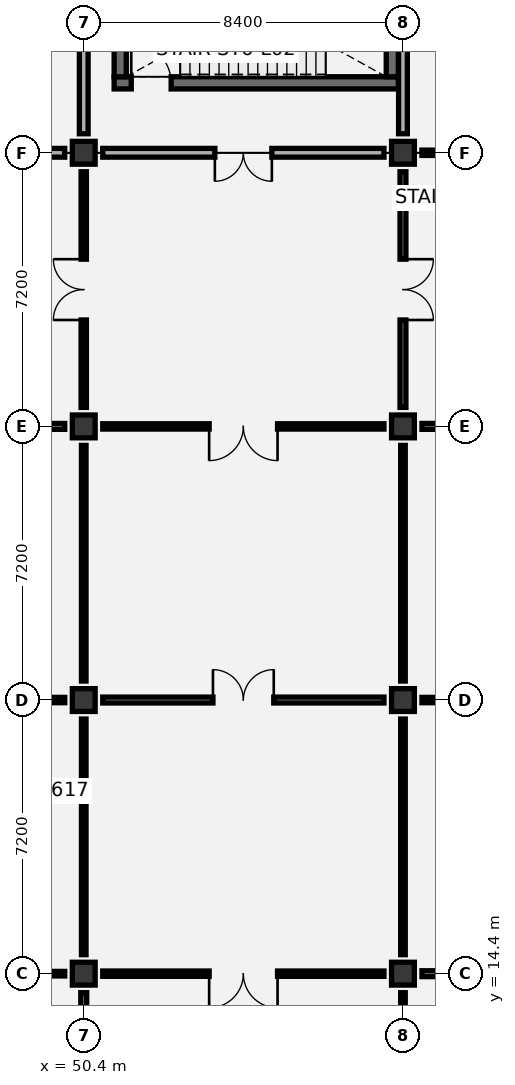
"""IFC4 building model, lengths in metres.
Left out: names, types, materials, properties, quantities, classifications, styles, units other than length and angle.
Written with IfcOpenShell. Run it as: python <this file> out.ifc"""

import sys

from ifc_helpers import new_model, si_unit, direction, frame, frame_2d, origin, origin_2d, place, context, subcontext, project, spatial, rectangle, extrude, element, fill, save


model = new_model("IFC4")
c1 = context("Model", 3, precision=1e-05, world=origin(), true_north=direction((0.0, 1.0)))
c2 = subcontext(c1, "Body", "Model", "MODEL_VIEW")
j1 = project(units=[si_unit("LENGTHUNIT", "METRE"), si_unit("PLANEANGLEUNIT", "RADIAN")], contexts=[c1])
p1 = place(None, origin())
s1 = spatial("IfcSite", under=j1, at=p1, CompositionType="ELEMENT")
p2 = place(p1, origin())
s2 = spatial("IfcBuilding", under=s1, at=p2, CompositionType="ELEMENT")
p3 = place(p2, frame((0.0, 0.0, 11.4)))
s3 = spatial("IfcBuildingStorey", under=s2, at=p3, CompositionType="ELEMENT", Elevation=11.4)
for number, where, z_axis, x_axis in (
    (1, (50.4, 14.4, 0.0), (0.0, 0.0, 1.0), (1.0, 0.0, 0.0)),
    (2, (50.4, 21.6, 0.0), (0.0, 0.0, 1.0), (1.0, 0.0, 0.0)),
    (3, (50.4, 28.8, 0.0), (0.0, 0.0, 1.0), (1.0, 0.0, 0.0)),
    (4, (50.4, 36.0, 0.0), (0.0, 0.0, 1.0), (1.0, 0.0, 0.0)),
    (5, (58.8, 14.4, 0.0), (0.0, 0.0, 1.0), (1.0, 0.0, 0.0)),
    (6, (58.8, 21.6, 0.0), (0.0, 0.0, 1.0), (1.0, 0.0, 0.0)),
    (7, (58.8, 28.8, 0.0), (0.0, 0.0, 1.0), (1.0, 0.0, 0.0)),
    (8, (58.8, 36.0, 0.0), (0.0, 0.0, 1.0), (1.0, 0.0, 0.0)),
):
    element("IfcColumn", number, at=place(p3, frame(where, z_axis=z_axis, x_axis=x_axis)), inside=s3, PredefinedType="COLUMN", context=c2, shape_type="SweptSolid", body=[
        extrude(rectangle(XDim=0.6, YDim=0.6, at=origin_2d()), origin(), (0.0, 0.0, 1.0), 5.4),
    ])
p4 = place(p3, frame((51.2, 37.84, 0.0), z_axis=(0.0, 0.0, 1.0), x_axis=(1.0, 0.0, 0.0)))
e9 = element("IfcWall", 9, at=p4, inside=s3, PredefinedType="SHEAR", context=c2, shape_type="SweptSolid", body=[
    extrude(rectangle(XDim=7.48, YDim=0.32, at=frame_2d((3.74, 0.0))), origin(), (0.0, 0.0, 1.0), 5.1),
])
p5 = place(p4, frame((0.45, 0.0, 0.0)))
e10 = element("IfcOpeningElement", 10, at=p5, cuts=e9, PredefinedType="OPENING", context=c2, shape_type="SweptSolid", body=[
    extrude(rectangle(XDim=1.05, YDim=2.15, at=frame_2d((0.525, 1.075))), frame((0.0, 0.17, 0.0), z_axis=(0.0, -1.0, 0.0), x_axis=(1.0, 0.0, 0.0)), (0.0, 0.0, 1.0), 0.34),
])
for number, where, z_axis, x_axis in (
    (11, (51.36, 38.0, 0.0), (0.0, 0.0, 1.0), (0.0, 1.0, 0.0)),
    (12, (58.52, 38.0, 0.0), (0.0, 0.0, 1.0), (0.0, 1.0, 0.0)),
):
    element("IfcWall", number, at=place(p3, frame(where, z_axis=z_axis, x_axis=x_axis)), inside=s3, PredefinedType="SHEAR", context=c2, shape_type="SweptSolid", body=[
        extrude(rectangle(XDim=3.8, YDim=0.32, at=frame_2d((1.9, 0.0))), origin(), (0.0, 0.0, 1.0), 5.1),
    ])
p6 = place(p3, frame((42.15, 19.2, 0.0), z_axis=(0.0, 0.0, 1.0), x_axis=(1.0, 0.0, 0.0)))
e13 = element("IfcWall", 13, at=p6, inside=s3, PredefinedType="PARTITIONING", context=c2, shape_type="SweptSolid", body=[
    extrude(rectangle(XDim=8.1, YDim=0.12, at=frame_2d((4.05, 0.0))), origin(), (0.0, 0.0, 1.0), 5.1),
])
p7 = place(p6, frame((1.08, 0.0, 0.0)))
e14 = element("IfcOpeningElement", 14, at=p7, cuts=e13, PredefinedType="OPENING", context=c2, shape_type="SweptSolid", body=[
    extrude(rectangle(XDim=0.95, YDim=2.1, at=frame_2d((0.475, 1.05))), frame((0.0, 0.07, 0.0), z_axis=(0.0, -1.0, 0.0), x_axis=(1.0, 0.0, 0.0)), (0.0, 0.0, 1.0), 0.14),
])
p8 = place(p6, frame((3.63, 0.0, 0.0)))
e15 = element("IfcOpeningElement", 15, at=p8, cuts=e13, PredefinedType="OPENING", context=c2, shape_type="SweptSolid", body=[
    extrude(rectangle(XDim=0.9, YDim=2.1, at=frame_2d((0.45, 1.05))), frame((0.0, 0.07, 0.0), z_axis=(0.0, -1.0, 0.0), x_axis=(1.0, 0.0, 0.0)), (0.0, 0.0, 1.0), 0.14),
])
p9 = place(p6, frame((6.13, 0.0, 0.0)))
e16 = element("IfcOpeningElement", 16, at=p9, cuts=e13, PredefinedType="OPENING", context=c2, shape_type="SweptSolid", body=[
    extrude(rectangle(XDim=1.0, YDim=2.1, at=frame_2d((0.5, 1.05))), frame((0.0, 0.07, 0.0), z_axis=(0.0, -1.0, 0.0), x_axis=(1.0, 0.0, 0.0)), (0.0, 0.0, 1.0), 0.14),
])
p10 = place(p3, frame((50.4, 7.7, 0.0), z_axis=(0.0, 0.0, 1.0), x_axis=(0.0, 1.0, 0.0)))
e17 = element("IfcWall", 17, at=p10, inside=s3, PredefinedType="PARTITIONING", context=c2, shape_type="SweptSolid", body=[
    extrude(rectangle(XDim=6.2, YDim=0.155, at=frame_2d((3.1, 0.0))), origin(), (0.0, 0.0, 1.0), 4.395),
])
p11 = place(p10, frame((2.2, 0.0, 0.0)))
e18 = element("IfcOpeningElement", 18, at=p11, cuts=e17, PredefinedType="OPENING", context=c2, shape_type="SweptSolid", body=[
    extrude(rectangle(XDim=1.8, YDim=2.25, at=frame_2d((0.9, 1.125))), frame((0.0, 0.087, 0.0), z_axis=(0.0, -1.0, 0.0), x_axis=(1.0, 0.0, 0.0)), (0.0, 0.0, 1.0), 0.175),
])
p12 = place(p3, frame((42.5, 14.4, 0.0), z_axis=(0.0, 0.0, 1.0), x_axis=(1.0, 0.0, 0.0)))
e19 = element("IfcWall", 19, at=p12, inside=s3, PredefinedType="PARTITIONING", context=c2, shape_type="SweptSolid", body=[
    extrude(rectangle(XDim=7.4, YDim=0.12, at=frame_2d((3.7, 0.0))), origin(), (0.0, 0.0, 1.0), 4.345),
])
p13 = place(p3, frame((50.4, 14.9, 0.0), z_axis=(0.0, 0.0, 1.0), x_axis=(0.0, 1.0, 0.0)))
e20 = element("IfcWall", 20, at=p13, inside=s3, PredefinedType="PARTITIONING", context=c2, shape_type="SweptSolid", body=[
    extrude(rectangle(XDim=6.2, YDim=0.12, at=frame_2d((3.1, 0.0))), origin(), (0.0, 0.0, 1.0), 4.595),
])
p14 = place(p3, frame((42.5, 21.6, 0.0), z_axis=(0.0, 0.0, 1.0), x_axis=(1.0, 0.0, 0.0)))
e21 = element("IfcWall", 21, at=p14, inside=s3, PredefinedType="PARTITIONING", context=c2, shape_type="SweptSolid", body=[
    extrude(rectangle(XDim=7.4, YDim=0.14, at=frame_2d((3.7, 0.0))), origin(), (0.0, 0.0, 1.0), 4.345),
])
p15 = place(p14, frame((2.9, 0.0, 0.0)))
e22 = element("IfcOpeningElement", 22, at=p15, cuts=e21, PredefinedType="OPENING", context=c2, shape_type="SweptSolid", body=[
    extrude(rectangle(XDim=1.6, YDim=2.2, at=frame_2d((0.8, 1.1))), frame((0.0, 0.08, 0.0), z_axis=(0.0, -1.0, 0.0), x_axis=(1.0, 0.0, 0.0)), (0.0, 0.0, 1.0), 0.16),
])
p16 = place(p3, frame((50.4, 22.1, 0.0), z_axis=(0.0, 0.0, 1.0), x_axis=(0.0, 1.0, 0.0)))
e23 = element("IfcWall", 23, at=p16, inside=s3, PredefinedType="PARTITIONING", context=c2, shape_type="SweptSolid", body=[
    extrude(rectangle(XDim=6.2, YDim=0.12, at=frame_2d((3.1, 0.0))), origin(), (0.0, 0.0, 1.0), 4.395),
])
p17 = place(p3, frame((42.5, 28.8, 0.0), z_axis=(0.0, 0.0, 1.0), x_axis=(1.0, 0.0, 0.0)))
e24 = element("IfcWall", 24, at=p17, inside=s3, PredefinedType="PARTITIONING", context=c2, shape_type="SweptSolid", body=[
    extrude(rectangle(XDim=7.4, YDim=0.155, at=frame_2d((3.7, 0.0))), origin(), (0.0, 0.0, 1.0), 4.345),
])
p18 = place(p17, frame((2.8, 0.0, 0.0)))
e25 = element("IfcOpeningElement", 25, at=p18, cuts=e24, PredefinedType="OPENING", context=c2, shape_type="SweptSolid", body=[
    extrude(rectangle(XDim=1.8, YDim=2.25, at=frame_2d((0.9, 1.125))), frame((0.0, 0.087, 0.0), z_axis=(0.0, -1.0, 0.0), x_axis=(1.0, 0.0, 0.0)), (0.0, 0.0, 1.0), 0.175),
])
p19 = place(p3, frame((50.4, 29.3, 0.0), z_axis=(0.0, 0.0, 1.0), x_axis=(0.0, 1.0, 0.0)))
e26 = element("IfcWall", 26, at=p19, inside=s3, PredefinedType="PARTITIONING", context=c2, shape_type="SweptSolid", body=[
    extrude(rectangle(XDim=6.2, YDim=0.14, at=frame_2d((3.1, 0.0))), origin(), (0.0, 0.0, 1.0), 4.695),
])
p20 = place(p19, frame((2.3, 0.0, 0.0)))
e27 = element("IfcOpeningElement", 27, at=p20, cuts=e26, PredefinedType="OPENING", context=c2, shape_type="SweptSolid", body=[
    extrude(rectangle(XDim=1.6, YDim=2.2, at=frame_2d((0.8, 1.1))), frame((0.0, 0.08, 0.0), z_axis=(0.0, -1.0, 0.0), x_axis=(1.0, 0.0, 0.0)), (0.0, 0.0, 1.0), 0.16),
])
p21 = place(p3, frame((42.5, 36.0, 0.0), z_axis=(0.0, 0.0, 1.0), x_axis=(1.0, 0.0, 0.0)))
e28 = element("IfcWall", 28, at=p21, inside=s3, PredefinedType="PARTITIONING", context=c2, shape_type="SweptSolid", body=[
    extrude(rectangle(XDim=7.4, YDim=0.23, at=frame_2d((3.7, 0.0))), origin(), (0.0, 0.0, 1.0), 4.345),
])
p22 = place(p21, frame((2.95, 0.0, 0.0)))
e29 = element("IfcOpeningElement", 29, at=p22, cuts=e28, PredefinedType="OPENING", context=c2, shape_type="SweptSolid", body=[
    extrude(rectangle(XDim=1.5, YDim=2.15, at=frame_2d((0.75, 1.075))), frame((0.0, 0.125, 0.0), z_axis=(0.0, -1.0, 0.0), x_axis=(1.0, 0.0, 0.0)), (0.0, 0.0, 1.0), 0.25),
])
p23 = place(p3, frame((50.4, 36.5, 0.0), z_axis=(0.0, 0.0, 1.0), x_axis=(0.0, 1.0, 0.0)))
e30 = element("IfcWall", 30, at=p23, inside=s3, PredefinedType="PARTITIONING", context=c2, shape_type="SweptSolid", body=[
    extrude(rectangle(XDim=6.2, YDim=0.23, at=frame_2d((3.1, 0.0))), origin(), (0.0, 0.0, 1.0), 4.395),
])
p24 = place(p3, frame((58.8, 7.7, 0.0), z_axis=(0.0, 0.0, 1.0), x_axis=(0.0, 1.0, 0.0)))
e31 = element("IfcWall", 31, at=p24, inside=s3, PredefinedType="PARTITIONING", context=c2, shape_type="SweptSolid", body=[
    extrude(rectangle(XDim=6.2, YDim=0.12, at=frame_2d((3.1, 0.0))), origin(), (0.0, 0.0, 1.0), 4.595),
])
p25 = place(p3, frame((50.9, 14.4, 0.0), z_axis=(0.0, 0.0, 1.0), x_axis=(1.0, 0.0, 0.0)))
e32 = element("IfcWall", 32, at=p25, inside=s3, PredefinedType="PARTITIONING", context=c2, shape_type="SweptSolid", body=[
    extrude(rectangle(XDim=7.4, YDim=0.14, at=frame_2d((3.7, 0.0))), origin(), (0.0, 0.0, 1.0), 4.345),
])
p26 = place(p25, frame((2.8, 0.0, 0.0)))
e33 = element("IfcOpeningElement", 33, at=p26, cuts=e32, PredefinedType="OPENING", context=c2, shape_type="SweptSolid", body=[
    extrude(rectangle(XDim=1.8, YDim=2.25, at=frame_2d((0.9, 1.125))), frame((0.0, 0.08, 0.0), z_axis=(0.0, -1.0, 0.0), x_axis=(1.0, 0.0, 0.0)), (0.0, 0.0, 1.0), 0.16),
])
p27 = place(p3, frame((58.8, 14.9, 0.0), z_axis=(0.0, 0.0, 1.0), x_axis=(0.0, 1.0, 0.0)))
e34 = element("IfcWall", 34, at=p27, inside=s3, PredefinedType="PARTITIONING", context=c2, shape_type="SweptSolid", body=[
    extrude(rectangle(XDim=6.2, YDim=0.12, at=frame_2d((3.1, 0.0))), origin(), (0.0, 0.0, 1.0), 4.395),
])
p28 = place(p3, frame((50.9, 21.6, 0.0), z_axis=(0.0, 0.0, 1.0), x_axis=(1.0, 0.0, 0.0)))
e35 = element("IfcWall", 35, at=p28, inside=s3, PredefinedType="PARTITIONING", context=c2, shape_type="SweptSolid", body=[
    extrude(rectangle(XDim=7.4, YDim=0.155, at=frame_2d((3.7, 0.0))), origin(), (0.0, 0.0, 1.0), 4.345),
])
p29 = place(p28, frame((2.9, 0.0, 0.0)))
e36 = element("IfcOpeningElement", 36, at=p29, cuts=e35, PredefinedType="OPENING", context=c2, shape_type="SweptSolid", body=[
    extrude(rectangle(XDim=1.6, YDim=2.2, at=frame_2d((0.8, 1.1))), frame((0.0, 0.087, 0.0), z_axis=(0.0, -1.0, 0.0), x_axis=(1.0, 0.0, 0.0)), (0.0, 0.0, 1.0), 0.175),
])
p30 = place(p3, frame((58.8, 22.1, 0.0), z_axis=(0.0, 0.0, 1.0), x_axis=(0.0, 1.0, 0.0)))
e37 = element("IfcWall", 37, at=p30, inside=s3, PredefinedType="PARTITIONING", context=c2, shape_type="SweptSolid", body=[
    extrude(rectangle(XDim=6.2, YDim=0.12, at=frame_2d((3.1, 0.0))), origin(), (0.0, 0.0, 1.0), 4.695),
])
p31 = place(p3, frame((50.9, 28.8, 0.0), z_axis=(0.0, 0.0, 1.0), x_axis=(1.0, 0.0, 0.0)))
e38 = element("IfcWall", 38, at=p31, inside=s3, PredefinedType="PARTITIONING", context=c2, shape_type="SweptSolid", body=[
    extrude(rectangle(XDim=7.4, YDim=0.14, at=frame_2d((3.7, 0.0))), origin(), (0.0, 0.0, 1.0), 4.345),
])
p32 = place(p31, frame((2.8, 0.0, 0.0)))
e39 = element("IfcOpeningElement", 39, at=p32, cuts=e38, PredefinedType="OPENING", context=c2, shape_type="SweptSolid", body=[
    extrude(rectangle(XDim=1.8, YDim=2.25, at=frame_2d((0.9, 1.125))), frame((0.0, 0.08, 0.0), z_axis=(0.0, -1.0, 0.0), x_axis=(1.0, 0.0, 0.0)), (0.0, 0.0, 1.0), 0.16),
])
p33 = place(p3, frame((58.8, 29.3, 0.0), z_axis=(0.0, 0.0, 1.0), x_axis=(0.0, 1.0, 0.0)))
e40 = element("IfcWall", 40, at=p33, inside=s3, PredefinedType="PARTITIONING", context=c2, shape_type="SweptSolid", body=[
    extrude(rectangle(XDim=6.2, YDim=0.155, at=frame_2d((3.1, 0.0))), origin(), (0.0, 0.0, 1.0), 4.395),
])
p34 = place(p33, frame((2.3, 0.0, 0.0)))
e41 = element("IfcOpeningElement", 41, at=p34, cuts=e40, PredefinedType="OPENING", context=c2, shape_type="SweptSolid", body=[
    extrude(rectangle(XDim=1.6, YDim=2.2, at=frame_2d((0.8, 1.1))), frame((0.0, 0.087, 0.0), z_axis=(0.0, -1.0, 0.0), x_axis=(1.0, 0.0, 0.0)), (0.0, 0.0, 1.0), 0.175),
])
p35 = place(p3, frame((50.9, 36.0, 0.0), z_axis=(0.0, 0.0, 1.0), x_axis=(1.0, 0.0, 0.0)))
e42 = element("IfcWall", 42, at=p35, inside=s3, PredefinedType="PARTITIONING", context=c2, shape_type="SweptSolid", body=[
    extrude(rectangle(XDim=7.4, YDim=0.23, at=frame_2d((3.7, 0.0))), origin(), (0.0, 0.0, 1.0), 4.345),
])
p36 = place(p35, frame((2.95, 0.0, 0.0)))
e43 = element("IfcOpeningElement", 43, at=p36, cuts=e42, PredefinedType="OPENING", context=c2, shape_type="SweptSolid", body=[
    extrude(rectangle(XDim=1.5, YDim=2.15, at=frame_2d((0.75, 1.075))), frame((0.0, 0.125, 0.0), z_axis=(0.0, -1.0, 0.0), x_axis=(1.0, 0.0, 0.0)), (0.0, 0.0, 1.0), 0.25),
])
p37 = place(p3, frame((58.8, 36.5, 0.0), z_axis=(0.0, 0.0, 1.0), x_axis=(0.0, 1.0, 0.0)))
e44 = element("IfcWall", 44, at=p37, inside=s3, PredefinedType="PARTITIONING", context=c2, shape_type="SweptSolid", body=[
    extrude(rectangle(XDim=6.2, YDim=0.23, at=frame_2d((3.1, 0.0))), origin(), (0.0, 0.0, 1.0), 4.805),
])
p38 = place(p3, frame((59.3, 14.4, 0.0), z_axis=(0.0, 0.0, 1.0), x_axis=(1.0, 0.0, 0.0)))
e45 = element("IfcWall", 45, at=p38, inside=s3, PredefinedType="PARTITIONING", context=c2, shape_type="SweptSolid", body=[
    extrude(rectangle(XDim=7.4, YDim=0.155, at=frame_2d((3.7, 0.0))), origin(), (0.0, 0.0, 1.0), 4.345),
])
p39 = place(p38, frame((2.8, 0.0, 0.0)))
e46 = element("IfcOpeningElement", 46, at=p39, cuts=e45, PredefinedType="OPENING", context=c2, shape_type="SweptSolid", body=[
    extrude(rectangle(XDim=1.8, YDim=2.25, at=frame_2d((0.9, 1.125))), frame((0.0, 0.087, 0.0), z_axis=(0.0, -1.0, 0.0), x_axis=(1.0, 0.0, 0.0)), (0.0, 0.0, 1.0), 0.175),
])
p40 = place(p3, frame((59.3, 21.6, 0.0), z_axis=(0.0, 0.0, 1.0), x_axis=(1.0, 0.0, 0.0)))
e47 = element("IfcWall", 47, at=p40, inside=s3, PredefinedType="PARTITIONING", context=c2, shape_type="SweptSolid", body=[
    extrude(rectangle(XDim=7.4, YDim=0.14, at=frame_2d((3.7, 0.0))), origin(), (0.0, 0.0, 1.0), 4.345),
])
p41 = place(p40, frame((2.9, 0.0, 0.0)))
e48 = element("IfcOpeningElement", 48, at=p41, cuts=e47, PredefinedType="OPENING", context=c2, shape_type="SweptSolid", body=[
    extrude(rectangle(XDim=1.6, YDim=2.2, at=frame_2d((0.8, 1.1))), frame((0.0, 0.08, 0.0), z_axis=(0.0, -1.0, 0.0), x_axis=(1.0, 0.0, 0.0)), (0.0, 0.0, 1.0), 0.16),
])
p42 = place(p3, frame((59.3, 28.8, 0.0), z_axis=(0.0, 0.0, 1.0), x_axis=(1.0, 0.0, 0.0)))
e49 = element("IfcWall", 49, at=p42, inside=s3, PredefinedType="PARTITIONING", context=c2, shape_type="SweptSolid", body=[
    extrude(rectangle(XDim=7.4, YDim=0.155, at=frame_2d((3.7, 0.0))), origin(), (0.0, 0.0, 1.0), 4.345),
])
p43 = place(p42, frame((2.8, 0.0, 0.0)))
e50 = element("IfcOpeningElement", 50, at=p43, cuts=e49, PredefinedType="OPENING", context=c2, shape_type="SweptSolid", body=[
    extrude(rectangle(XDim=1.8, YDim=2.25, at=frame_2d((0.9, 1.125))), frame((0.0, 0.087, 0.0), z_axis=(0.0, -1.0, 0.0), x_axis=(1.0, 0.0, 0.0)), (0.0, 0.0, 1.0), 0.175),
])
p44 = place(p3, frame((59.3, 36.0, 0.0), z_axis=(0.0, 0.0, 1.0), x_axis=(1.0, 0.0, 0.0)))
e51 = element("IfcWall", 51, at=p44, inside=s3, PredefinedType="PARTITIONING", context=c2, shape_type="SweptSolid", body=[
    extrude(rectangle(XDim=7.4, YDim=0.14, at=frame_2d((3.7, 0.0))), origin(), (0.0, 0.0, 1.0), 4.345),
])
p45 = place(p44, frame((2.9, 0.0, 0.0)))
e52 = element("IfcOpeningElement", 52, at=p45, cuts=e51, PredefinedType="OPENING", context=c2, shape_type="SweptSolid", body=[
    extrude(rectangle(XDim=1.6, YDim=2.2, at=frame_2d((0.8, 1.1))), frame((0.0, 0.08, 0.0), z_axis=(0.0, -1.0, 0.0), x_axis=(1.0, 0.0, 0.0)), (0.0, 0.0, 1.0), 0.16),
])
p46 = place(p5, origin())
e53 = element("IfcDoor", 53, at=p46, inside=s3, OperationType="SINGLE_SWING_LEFT", PredefinedType="DOOR", context=c2, shape_type="SweptSolid", body=[
    extrude(rectangle(XDim=1.05, YDim=2.15, at=frame_2d((0.525, 1.075))), frame((0.0, 0.025, 0.0), z_axis=(0.0, -1.0, 0.0), x_axis=(1.0, 0.0, 0.0)), (0.0, 0.0, 1.0), 0.05),
])
fill(e10, e53)
p47 = place(p20, origin())
e54 = element("IfcDoor", 54, at=p47, inside=s3, OperationType="DOUBLE_DOOR_SINGLE_SWING", PredefinedType="DOOR", context=c2, shape_type="SweptSolid", body=[
    extrude(rectangle(XDim=1.6, YDim=2.2, at=frame_2d((0.8, 1.1))), frame((0.0, 0.025, 0.0), z_axis=(0.0, -1.0, 0.0), x_axis=(1.0, 0.0, 0.0)), (0.0, 0.0, 1.0), 0.05),
])
fill(e27, e54)
p48 = place(p26, frame((1.8, 0.0, 0.0), z_axis=(0.0, 0.0, 1.0), x_axis=(-1.0, 0.0, 0.0)))
e55 = element("IfcDoor", 55, at=p48, inside=s3, OperationType="DOUBLE_DOOR_SINGLE_SWING", PredefinedType="DOOR", context=c2, shape_type="SweptSolid", body=[
    extrude(rectangle(XDim=1.8, YDim=2.25, at=frame_2d((0.9, 1.125))), frame((0.0, 0.025, 0.0), z_axis=(0.0, -1.0, 0.0), x_axis=(1.0, 0.0, 0.0)), (0.0, 0.0, 1.0), 0.05),
])
fill(e33, e55)
p49 = place(p29, origin())
e56 = element("IfcDoor", 56, at=p49, inside=s3, OperationType="DOUBLE_DOOR_SINGLE_SWING", PredefinedType="DOOR", context=c2, shape_type="SweptSolid", body=[
    extrude(rectangle(XDim=1.6, YDim=2.2, at=frame_2d((0.8, 1.1))), frame((0.0, 0.025, 0.0), z_axis=(0.0, -1.0, 0.0), x_axis=(1.0, 0.0, 0.0)), (0.0, 0.0, 1.0), 0.05),
])
fill(e36, e56)
p50 = place(p32, frame((1.8, 0.0, 0.0), z_axis=(0.0, 0.0, 1.0), x_axis=(-1.0, 0.0, 0.0)))
e57 = element("IfcDoor", 57, at=p50, inside=s3, OperationType="DOUBLE_DOOR_SINGLE_SWING", PredefinedType="DOOR", context=c2, shape_type="SweptSolid", body=[
    extrude(rectangle(XDim=1.8, YDim=2.25, at=frame_2d((0.9, 1.125))), frame((0.0, 0.025, 0.0), z_axis=(0.0, -1.0, 0.0), x_axis=(1.0, 0.0, 0.0)), (0.0, 0.0, 1.0), 0.05),
])
fill(e39, e57)
p51 = place(p34, frame((1.6, 0.0, 0.0), z_axis=(0.0, 0.0, 1.0), x_axis=(-1.0, 0.0, 0.0)))
e58 = element("IfcDoor", 58, at=p51, inside=s3, OperationType="DOUBLE_DOOR_SINGLE_SWING", PredefinedType="DOOR", context=c2, shape_type="SweptSolid", body=[
    extrude(rectangle(XDim=1.6, YDim=2.2, at=frame_2d((0.8, 1.1))), frame((0.0, 0.025, 0.0), z_axis=(0.0, -1.0, 0.0), x_axis=(1.0, 0.0, 0.0)), (0.0, 0.0, 1.0), 0.05),
])
fill(e41, e58)
p52 = place(p36, frame((1.5, 0.0, 0.0), z_axis=(0.0, 0.0, 1.0), x_axis=(-1.0, 0.0, 0.0)))
e59 = element("IfcDoor", 59, at=p52, inside=s3, OperationType="DOUBLE_DOOR_SINGLE_SWING", PredefinedType="DOOR", context=c2, shape_type="SweptSolid", body=[
    extrude(rectangle(XDim=1.5, YDim=2.15, at=frame_2d((0.75, 1.075))), frame((0.0, 0.025, 0.0), z_axis=(0.0, -1.0, 0.0), x_axis=(1.0, 0.0, 0.0)), (0.0, 0.0, 1.0), 0.05),
])
fill(e43, e59)
save(model, sys.argv[1])
